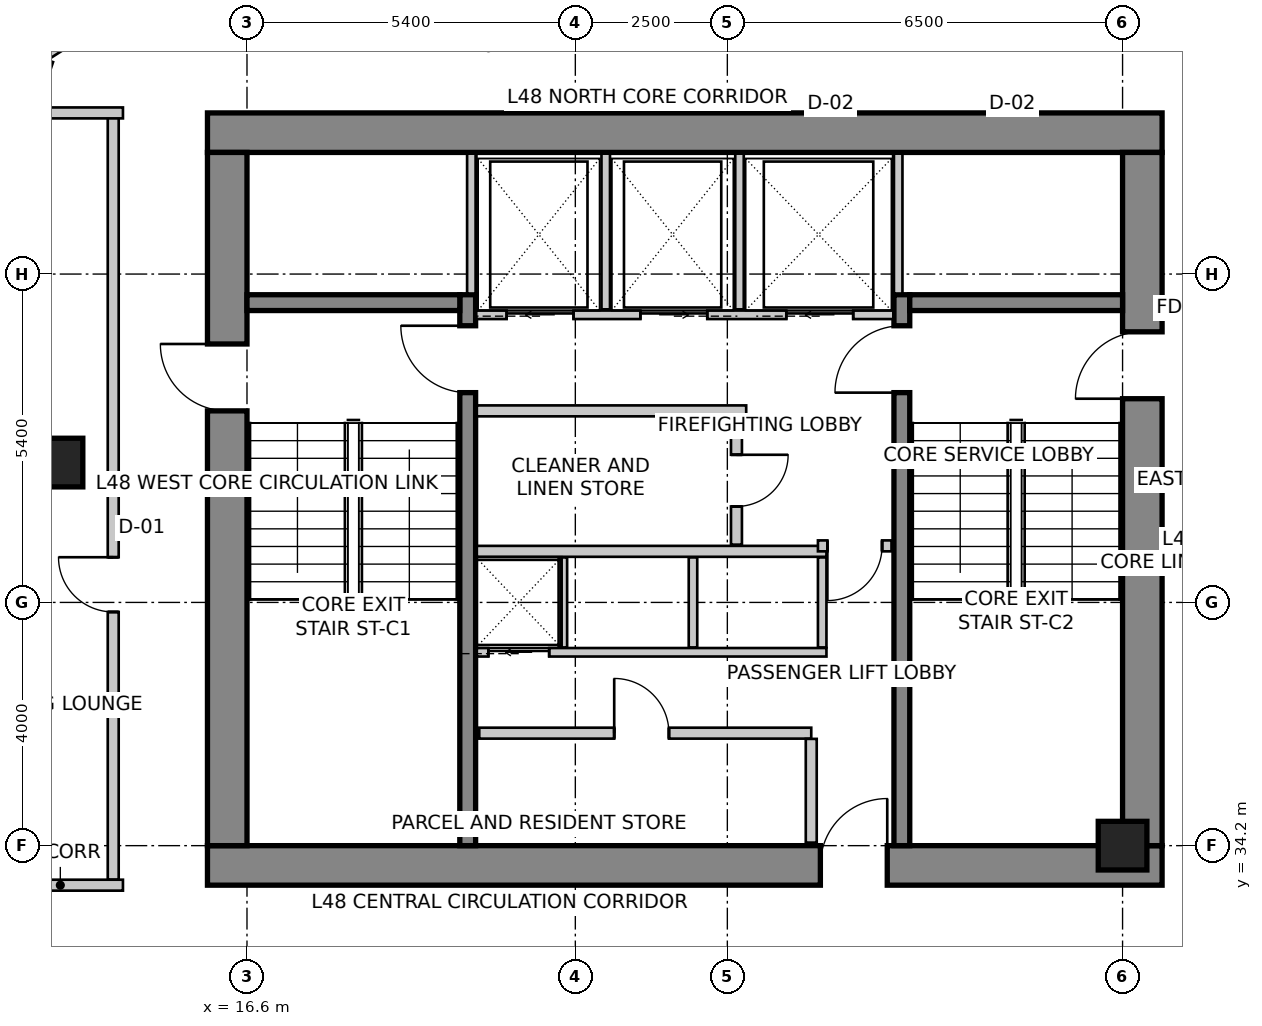
"""IFC4 building model, lengths in metres.
Left out: names, types, materials, properties, quantities, classifications, styles, units other than length and angle.
Written with IfcOpenShell. Run it as: python <this file> out.ifc"""

import sys

from ifc_helpers import new_model, si_unit, direction, frame, frame_2d, origin, origin_2d, place, context, subcontext, project, spatial, rectangle, extrude, source, transform, mapped, element, fill, save


model = new_model("IFC4")
c1 = context("Model", 3, precision=1e-05, world=origin(), true_north=direction((0.0, 1.0)))
c2 = subcontext(c1, "Body", "Model", "MODEL_VIEW")
j1 = project(units=[si_unit("LENGTHUNIT", "METRE"), si_unit("PLANEANGLEUNIT", "RADIAN")], contexts=[c1])
p1 = place(None, origin())
s1 = spatial("IfcSite", under=j1, at=p1, CompositionType="ELEMENT")
p2 = place(p1, origin())
s2 = spatial("IfcBuilding", under=s1, at=p2, CompositionType="ELEMENT")
p3 = place(p2, frame((0.0, 0.0, 193.9)))
s3 = spatial("IfcBuildingStorey", under=s2, at=p3, CompositionType="ELEMENT", Elevation=193.9)
p4 = place(p3, frame((15.95, 45.925, 0.0), z_axis=(0.0, 0.0, 1.0), x_axis=(1.0, 0.0, 0.0)))
e1 = element("IfcWall", 1, at=p4, inside=s3, PredefinedType="SHEAR", context=c2, shape_type="SweptSolid", body=[
    extrude(rectangle(XDim=15.7, YDim=0.65, at=frame_2d((7.85, 0.0))), origin(), (0.0, 0.0, 1.0), 3.5),
])
p5 = place(p3, frame((15.95, 33.875, 0.0), z_axis=(0.0, 0.0, 1.0), x_axis=(1.0, 0.0, 0.0)))
e2 = element("IfcWall", 2, at=p5, inside=s3, PredefinedType="SHEAR", context=c2, shape_type="SweptSolid", body=[
    extrude(rectangle(XDim=15.7, YDim=0.65, at=frame_2d((7.85, 0.0))), origin(), (0.0, 0.0, 1.0), 3.5),
])
m1 = source(origin(), c2, "Body", "SweptSolid", [
    extrude(rectangle(XDim=1.1, YDim=2.15, at=frame_2d((0.55, 1.075))), frame((0.0, 0.335, 0.0), z_axis=(0.0, -1.0, 0.0), x_axis=(1.0, 0.0, 0.0)), (0.0, 0.0, 1.0), 0.67),
])
p6 = place(p5, frame((10.08, 0.0, 0.0)))
e3 = element("IfcOpeningElement", 3, at=p6, cuts=e2, PredefinedType="OPENING", context=c2, shape_type="MappedRepresentation", body=[
    mapped(m1, transform((0.0, 0.0, 0.0), scale=1.0)),
])
p7 = place(p3, frame((16.275, 34.2, 0.0), z_axis=(0.0, 0.0, 1.0), x_axis=(0.0, 1.0, 0.0)))
e4 = element("IfcWall", 4, at=p7, inside=s3, PredefinedType="SHEAR", context=c2, shape_type="SweptSolid", body=[
    extrude(rectangle(XDim=11.4, YDim=0.65, at=frame_2d((5.7, 0.0))), origin(), (0.0, 0.0, 1.0), 3.5),
])
p8 = place(p7, frame((7.15, 0.0, 0.0)))
e5 = element("IfcOpeningElement", 5, at=p8, cuts=e4, PredefinedType="OPENING", context=c2, shape_type="MappedRepresentation", body=[
    mapped(m1, transform((0.0, 0.0, 0.0), scale=1.0)),
])
p9 = place(p3, frame((31.325, 34.2, 0.0), z_axis=(0.0, 0.0, 1.0), x_axis=(0.0, 1.0, 0.0)))
e6 = element("IfcWall", 6, at=p9, inside=s3, PredefinedType="SHEAR", context=c2, shape_type="SweptSolid", body=[
    extrude(rectangle(XDim=11.4, YDim=0.65, at=frame_2d((5.7, 0.0))), origin(), (0.0, 0.0, 1.0), 3.5),
])
p10 = place(p9, frame((7.35, 0.0, 0.0)))
e7 = element("IfcOpeningElement", 7, at=p10, cuts=e6, PredefinedType="OPENING", context=c2, shape_type="MappedRepresentation", body=[
    mapped(m1, transform((0.0, 0.0, 0.0), scale=1.0)),
])
p11 = place(p3, frame((20.23, 34.2, 0.0), z_axis=(0.0, 0.0, 1.0), x_axis=(0.0, 1.0, 0.0)))
e8 = element("IfcWall", 8, at=p11, inside=s3, PredefinedType="SHEAR", context=c2, shape_type="SweptSolid", body=[
    extrude(rectangle(XDim=9.06, YDim=0.26, at=frame_2d((4.53, 0.0))), origin(), (0.0, 0.0, 1.0), 3.5),
])
m2 = source(origin(), c2, "Body", "SweptSolid", [
    extrude(rectangle(XDim=1.1, YDim=2.15, at=frame_2d((0.55, 1.075))), frame((0.0, 0.14, 0.0), z_axis=(0.0, -1.0, 0.0), x_axis=(1.0, 0.0, 0.0)), (0.0, 0.0, 1.0), 0.28),
])
p12 = place(p11, frame((7.45, 0.0, 0.0)))
e9 = element("IfcOpeningElement", 9, at=p12, cuts=e8, PredefinedType="OPENING", context=c2, shape_type="MappedRepresentation", body=[
    mapped(m2, transform((0.0, 0.0, 0.0), scale=1.0)),
])
p13 = place(p3, frame((27.37, 34.2, 0.0), z_axis=(0.0, 0.0, 1.0), x_axis=(0.0, 1.0, 0.0)))
e10 = element("IfcWall", 10, at=p13, inside=s3, PredefinedType="SHEAR", context=c2, shape_type="SweptSolid", body=[
    extrude(rectangle(XDim=9.06, YDim=0.26, at=frame_2d((4.53, 0.0))), origin(), (0.0, 0.0, 1.0), 3.5),
])
p14 = place(p13, frame((7.45, 0.0, 0.0)))
e11 = element("IfcOpeningElement", 11, at=p14, cuts=e10, PredefinedType="OPENING", context=c2, shape_type="MappedRepresentation", body=[
    mapped(m2, transform((0.0, 0.0, 0.0), scale=1.0)),
])
for number, where, z_axis, x_axis in (
    (12, (16.6, 43.13, 0.0), (0.0, 0.0, 1.0), (1.0, 0.0, 0.0)),
    (13, (27.5, 43.13, 0.0), (0.0, 0.0, 1.0), (1.0, 0.0, 0.0)),
):
    element("IfcWall", number, at=place(p3, frame(where, z_axis=z_axis, x_axis=x_axis)), inside=s3, PredefinedType="SHEAR", context=c2, shape_type="SweptSolid", body=[
        extrude(rectangle(XDim=3.5, YDim=0.26, at=frame_2d((1.75, 0.0))), origin(), (0.0, 0.0, 1.0), 3.5),
    ])
m3 = source(origin(), c2, "Body", "SweptSolid", [
    extrude(rectangle(XDim=0.8, YDim=0.8, at=origin_2d()), origin(), (0.0, 0.0, 1.0), 3.5),
])
for number, where, z_axis, x_axis in (
    (14, (13.5, 40.5, 0.0), (0.0, 0.0, 1.0), (1.0, 0.0, 0.0)),
    (15, (31.0, 34.2, 0.0), (0.0, 0.0, 1.0), (1.0, 0.0, 0.0)),
):
    element("IfcColumn", number, at=place(p3, frame(where, z_axis=z_axis, x_axis=x_axis)), inside=s3, PredefinedType="COLUMN", context=c2, shape_type="MappedRepresentation", body=[
        mapped(m3, transform((0.0, 0.0, 0.0), scale=1.0)),
    ])
p15 = place(p3, frame((21.875, 52.742, 0.0), z_axis=(0.0, 0.0, 1.0), x_axis=(-0.843666375448, -0.536867811419, 0.0)))
e16 = element("IfcWall", 16, at=p15, inside=s3, PredefinedType="SOLIDWALL", context=c2, shape_type="SweptSolid", body=[
    extrude(rectangle(XDim=10.284, YDim=0.3, at=frame_2d((5.142, 0.0))), origin(), (0.0, 0.0, 1.0), 3.25),
])
m4 = source(origin(), c2, "Body", "SweptSolid", [
    extrude(rectangle(XDim=2.1, YDim=2.0, at=frame_2d((1.05, 1.0))), frame((0.0, 0.16, 0.0), z_axis=(0.0, -1.0, 0.0), x_axis=(1.0, 0.0, 0.0)), (0.0, 0.0, 1.0), 0.32),
])
p16 = place(p15, frame((3.457, 0.0, 0.85)))
e17 = element("IfcOpeningElement", 17, at=p16, cuts=e16, PredefinedType="OPENING", context=c2, shape_type="MappedRepresentation", body=[
    mapped(m4, transform((0.0, 0.0, 0.0), scale=1.0)),
])
p17 = place(p3, frame((13.269, 47.134, 0.0), z_axis=(0.0, 0.0, 1.0), x_axis=(-0.319920776449, -0.947444297464, 0.0)))
e18 = element("IfcWall", 18, at=p17, inside=s3, PredefinedType="SOLIDWALL", context=c2, shape_type="SweptSolid", body=[
    extrude(rectangle(XDim=16.133, YDim=0.3, at=frame_2d((8.067, 0.0))), origin(), (0.0, 0.0, 1.0), 3.25),
])
m5 = source(origin(), c2, "Body", "SweptSolid", [
    extrude(rectangle(XDim=2.4, YDim=2.2, at=frame_2d((1.2, 1.1))), frame((0.0, 0.16, 0.0), z_axis=(0.0, -1.0, 0.0), x_axis=(1.0, 0.0, 0.0)), (0.0, 0.0, 1.0), 0.32),
])
p18 = place(p17, frame((2.363, 0.0, 0.85)))
e19 = element("IfcOpeningElement", 19, at=p18, cuts=e18, PredefinedType="OPENING", context=c2, shape_type="MappedRepresentation", body=[
    mapped(m5, transform((0.0, 0.0, 0.0), scale=1.0)),
])
p19 = place(p17, frame((7.41, 0.0, 0.85)))
e20 = element("IfcOpeningElement", 20, at=p19, cuts=e18, PredefinedType="OPENING", context=c2, shape_type="MappedRepresentation", body=[
    mapped(m4, transform((0.0, 0.0, 0.0), scale=1.0)),
])
p20 = place(p17, frame((12.157, 0.0, 0.85)))
e21 = element("IfcOpeningElement", 21, at=p20, cuts=e18, PredefinedType="OPENING", context=c2, shape_type="MappedRepresentation", body=[
    mapped(m5, transform((0.0, 0.0, 0.0), scale=1.0)),
])
p21 = place(p3, frame((20.37, 42.93, 0.0), z_axis=(0.0, 0.0, 1.0), x_axis=(1.0, 0.0, 0.0)))
e22 = element("IfcWall", 22, at=p21, inside=s3, PredefinedType="SOLIDWALL", context=c2, shape_type="SweptSolid", body=[
    extrude(rectangle(XDim=6.86, YDim=0.14, at=frame_2d((3.43, 0.0))), origin(), (0.0, 0.0, 1.0), 3.25),
])
m6 = source(origin(), c2, "Body", "SweptSolid", [
    extrude(rectangle(XDim=1.1, YDim=2.15, at=frame_2d((0.55, 1.075))), frame((0.0, 0.08, 0.0), z_axis=(0.0, -1.0, 0.0), x_axis=(1.0, 0.0, 0.0)), (0.0, 0.0, 1.0), 0.16),
])
p22 = place(p21, frame((0.5, 0.0, 0.0)))
e23 = element("IfcOpeningElement", 23, at=p22, cuts=e22, PredefinedType="OPENING", context=c2, shape_type="MappedRepresentation", body=[
    mapped(m6, transform((0.0, 0.0, 0.0), scale=1.0)),
])
p23 = place(p21, frame((2.7, 0.0, 0.0)))
e24 = element("IfcOpeningElement", 24, at=p23, cuts=e22, PredefinedType="OPENING", context=c2, shape_type="MappedRepresentation", body=[
    mapped(m6, transform((0.0, 0.0, 0.0), scale=1.0)),
])
p24 = place(p21, frame((5.1, 0.0, 0.0)))
e25 = element("IfcOpeningElement", 25, at=p24, cuts=e22, PredefinedType="OPENING", context=c2, shape_type="MappedRepresentation", body=[
    mapped(m6, transform((0.0, 0.0, 0.0), scale=1.0)),
])
for number, where, z_axis, x_axis in (
    (26, (20.29, 43.28, 0.0), (0.0, 0.0, 1.0), (0.0, 1.0, 0.0)),
    (27, (27.31, 43.28, 0.0), (0.0, 0.0, 1.0), (0.0, 1.0, 0.0)),
):
    element("IfcWall", number, at=place(p3, frame(where, z_axis=z_axis, x_axis=x_axis)), inside=s3, PredefinedType="SOLIDWALL", context=c2, shape_type="SweptSolid", body=[
        extrude(rectangle(XDim=2.3, YDim=0.14, at=frame_2d((1.15, 0.0))), origin(), (0.0, 0.0, 1.0), 3.25),
    ])
for number, where, z_axis, x_axis in (
    (28, (22.5, 43.02, 0.0), (0.0, 0.0, 1.0), (0.0, 1.0, 0.0)),
    (29, (24.7, 43.02, 0.0), (0.0, 0.0, 1.0), (0.0, 1.0, 0.0)),
):
    element("IfcWall", number, at=place(p3, frame(where, z_axis=z_axis, x_axis=x_axis)), inside=s3, PredefinedType="SOLIDWALL", context=c2, shape_type="SweptSolid", body=[
        extrude(rectangle(XDim=2.56, YDim=0.14, at=frame_2d((1.28, 0.0))), origin(), (0.0, 0.0, 1.0), 3.25),
    ])
p25 = place(p3, frame((20.38, 37.38, 0.0), z_axis=(0.0, 0.0, 1.0), x_axis=(1.0, 0.0, 0.0)))
e30 = element("IfcWall", 30, at=p25, inside=s3, PredefinedType="SOLIDWALL", context=c2, shape_type="SweptSolid", body=[
    extrude(rectangle(XDim=5.75, YDim=0.14, at=frame_2d((2.875, 0.0))), origin(), (0.0, 0.0, 1.0), 3.25),
])
m7 = source(origin(), c2, "Body", "SweptSolid", [
    extrude(rectangle(XDim=1.0, YDim=2.15, at=frame_2d((0.5, 1.075))), frame((0.0, 0.08, 0.0), z_axis=(0.0, -1.0, 0.0), x_axis=(1.0, 0.0, 0.0)), (0.0, 0.0, 1.0), 0.16),
])
p26 = place(p25, frame((0.19, 0.0, 0.0)))
e31 = element("IfcOpeningElement", 31, at=p26, cuts=e30, PredefinedType="OPENING", context=c2, shape_type="MappedRepresentation", body=[
    mapped(m7, transform((0.0, 0.0, 0.0), scale=1.0)),
])
p27 = place(p3, frame((20.38, 39.04, 0.0), z_axis=(0.0, 0.0, 1.0), x_axis=(1.0, 0.0, 0.0)))
e32 = element("IfcWall", 32, at=p27, inside=s3, PredefinedType="SOLIDWALL", context=c2, shape_type="SweptSolid", body=[
    extrude(rectangle(XDim=5.75, YDim=0.18, at=frame_2d((2.875, 0.0))), origin(), (0.0, 0.0, 1.0), 3.25),
])
for number, where, z_axis, x_axis in (
    (33, (26.06, 37.46, 0.0), (0.0, 0.0, 1.0), (0.0, 1.0, 0.0)),
    (34, (21.795, 37.46, 0.0), (0.0, 0.0, 1.0), (0.0, 1.0, 0.0)),
    (35, (23.935, 37.46, 0.0), (0.0, 0.0, 1.0), (0.0, 1.0, 0.0)),
):
    element("IfcWall", number, at=place(p3, frame(where, z_axis=z_axis, x_axis=x_axis)), inside=s3, PredefinedType="SOLIDWALL", context=c2, shape_type="SweptSolid", body=[
        extrude(rectangle(XDim=1.48, YDim=0.14, at=frame_2d((0.74, 0.0))), origin(), (0.0, 0.0, 1.0), 3.25),
    ])
p28 = place(p3, frame((24.81, 41.35, 0.0), z_axis=(0.0, 0.0, 1.0), x_axis=(-1.0, 0.0, 0.0)))
e36 = element("IfcWall", 36, at=p28, inside=s3, PredefinedType="PARTITIONING", context=c2, shape_type="SweptSolid", body=[
    extrude(rectangle(XDim=4.43, YDim=0.18, at=frame_2d((2.215, 0.0))), origin(), (0.0, 0.0, 1.0), 3.25),
])
p29 = place(p3, frame((24.65, 41.256, 0.0), z_axis=(0.0, 0.0, 1.0), x_axis=(0.0, -1.0, 0.0)))
e37 = element("IfcWall", 37, at=p29, inside=s3, PredefinedType="PARTITIONING", context=c2, shape_type="SweptSolid", body=[
    extrude(rectangle(XDim=2.106, YDim=0.18, at=frame_2d((1.053, 0.0))), origin(), (0.0, 0.0, 1.0), 3.25),
])
m8 = source(origin(), c2, "Body", "SweptSolid", [
    extrude(rectangle(XDim=0.85, YDim=2.15, at=frame_2d((0.425, 1.075))), frame((0.0, 0.1, 0.0), z_axis=(0.0, -1.0, 0.0), x_axis=(1.0, 0.0, 0.0)), (0.0, 0.0, 1.0), 0.2),
])
p30 = place(p29, frame((0.628, 0.0, 0.0)))
e38 = element("IfcOpeningElement", 38, at=p30, cuts=e37, PredefinedType="OPENING", context=c2, shape_type="MappedRepresentation", body=[
    mapped(m8, transform((0.0, 0.0, 0.0), scale=1.0)),
])
p31 = place(p3, frame((27.2, 39.13, 0.0), z_axis=(0.0, 0.0, 1.0), x_axis=(-1.0, 0.0, 0.0)))
e39 = element("IfcWall", 39, at=p31, inside=s3, PredefinedType="PARTITIONING", context=c2, shape_type="SweptSolid", body=[
    extrude(rectangle(XDim=1.21, YDim=0.18, at=frame_2d((0.605, 0.0))), origin(), (0.0, 0.0, 1.0), 3.25),
])
m9 = source(origin(), c2, "Body", "SweptSolid", [
    extrude(rectangle(XDim=0.9, YDim=2.15, at=frame_2d((0.45, 1.075))), frame((0.0, 0.1, 0.0), z_axis=(0.0, -1.0, 0.0), x_axis=(1.0, 0.0, 0.0)), (0.0, 0.0, 1.0), 0.2),
])
p32 = place(p31, frame((0.155, 0.0, 0.0)))
e40 = element("IfcOpeningElement", 40, at=p32, cuts=e39, PredefinedType="OPENING", context=c2, shape_type="MappedRepresentation", body=[
    mapped(m9, transform((0.0, 0.0, 0.0), scale=1.0)),
])
p33 = place(p3, frame((20.42, 36.05, 0.0), z_axis=(0.0, 0.0, 1.0), x_axis=(1.0, 0.0, 0.0)))
e41 = element("IfcWall", 41, at=p33, inside=s3, PredefinedType="PARTITIONING", context=c2, shape_type="SweptSolid", body=[
    extrude(rectangle(XDim=5.46, YDim=0.18, at=frame_2d((2.73, 0.0))), origin(), (0.0, 0.0, 1.0), 3.25),
])
p34 = place(p33, frame((2.219, 0.0, 0.0)))
e42 = element("IfcOpeningElement", 42, at=p34, cuts=e41, PredefinedType="OPENING", context=c2, shape_type="MappedRepresentation", body=[
    mapped(m9, transform((0.0, 0.0, 0.0), scale=1.0)),
])
p35 = place(p3, frame((25.88, 35.956, 0.0), z_axis=(0.0, 0.0, 1.0), x_axis=(0.0, -1.0, 0.0)))
e43 = element("IfcWall", 43, at=p35, inside=s3, PredefinedType="PARTITIONING", context=c2, shape_type="SweptSolid", body=[
    extrude(rectangle(XDim=1.706, YDim=0.18, at=frame_2d((0.853, 0.0))), origin(), (0.0, 0.0, 1.0), 2.542),
])
p36 = place(p3, frame((12.5, 33.55, 0.0), z_axis=(0.0, 0.0, 1.0), x_axis=(1.0, 0.0, 0.0)))
e44 = element("IfcWall", 44, at=p36, inside=s3, PredefinedType="PARTITIONING", context=c2, shape_type="SweptSolid", body=[
    extrude(rectangle(XDim=2.06, YDim=0.18, at=frame_2d((1.03, 0.0))), origin(), (0.0, 0.0, 1.0), 3.25),
])
p37 = place(p3, frame((14.4, 33.644, 0.0), z_axis=(0.0, 0.0, 1.0), x_axis=(0.0, 1.0, 0.0)))
e45 = element("IfcWall", 45, at=p37, inside=s3, PredefinedType="PARTITIONING", context=c2, shape_type="SweptSolid", body=[
    extrude(rectangle(XDim=12.606, YDim=0.18, at=frame_2d((6.303, 0.0))), origin(), (0.0, 0.0, 1.0), 3.25),
])
p38 = place(p37, frame((4.399, 0.0, 0.0)))
e46 = element("IfcOpeningElement", 46, at=p38, cuts=e45, PredefinedType="OPENING", context=c2, shape_type="MappedRepresentation", body=[
    mapped(m9, transform((0.0, 0.0, 0.0), scale=1.0)),
])
p39 = place(p3, frame((14.56, 46.25, 0.0), z_axis=(0.0, 0.0, 1.0), x_axis=(-1.0, 0.0, 0.0)))
e47 = element("IfcWall", 47, at=p39, inside=s3, PredefinedType="PARTITIONING", context=c2, shape_type="SweptSolid", body=[
    extrude(rectangle(XDim=1.469, YDim=0.18, at=frame_2d((0.734, 0.0))), origin(), (0.0, 0.0, 1.0), 3.25),
])
m10 = source(origin(), c2, "Body", "SweptSolid", [
    extrude(rectangle(XDim=1.1, YDim=2.15, at=frame_2d((0.55, 1.075))), frame((0.0, 0.025, 0.0), z_axis=(0.0, -1.0, 0.0), x_axis=(1.0, 0.0, 0.0)), (0.0, 0.0, 1.0), 0.05),
])
p40 = place(p22, origin())
e48 = element("IfcDoor", 48, at=p40, inside=s3, OperationType="SLIDING_TO_LEFT", PredefinedType="DOOR", context=c2, shape_type="MappedRepresentation", body=[
    mapped(m10, transform((0.0, 0.0, 0.0), scale=1.0)),
])
fill(e23, e48)
p41 = place(p23, origin())
e49 = element("IfcDoor", 49, at=p41, inside=s3, OperationType="SLIDING_TO_RIGHT", PredefinedType="DOOR", context=c2, shape_type="MappedRepresentation", body=[
    mapped(m10, transform((0.0, 0.0, 0.0), scale=1.0)),
])
fill(e24, e49)
m11 = source(origin(), c2, "Body", "SweptSolid", [
    extrude(rectangle(XDim=1.1, YDim=2.15, at=frame_2d((0.55, 1.075))), frame((0.0, 0.025, 0.0), z_axis=(0.0, -1.0, 0.0), x_axis=(1.0, 0.0, 0.0)), (0.0, 0.0, 1.0), 0.05),
])
p42 = place(p24, origin())
e50 = element("IfcDoor", 50, at=p42, inside=s3, OperationType="SLIDING_TO_LEFT", PredefinedType="DOOR", context=c2, shape_type="MappedRepresentation", body=[
    mapped(m11, transform((0.0, 0.0, 0.0), scale=1.0)),
])
fill(e25, e50)
m12 = source(origin(), c2, "Body", "SweptSolid", [
    extrude(rectangle(XDim=1.0, YDim=2.15, at=frame_2d((0.5, 1.075))), frame((0.0, 0.025, 0.0), z_axis=(0.0, -1.0, 0.0), x_axis=(1.0, 0.0, 0.0)), (0.0, 0.0, 1.0), 0.05),
])
p43 = place(p26, origin())
e51 = element("IfcDoor", 51, at=p43, inside=s3, OperationType="SLIDING_TO_LEFT", PredefinedType="DOOR", context=c2, shape_type="MappedRepresentation", body=[
    mapped(m12, transform((0.0, 0.0, 0.0), scale=1.0)),
])
fill(e31, e51)
m13 = source(origin(), c2, "Body", "SweptSolid", [
    extrude(rectangle(XDim=1.1, YDim=2.15, at=frame_2d((0.55, 1.075))), frame((0.0, 0.025, 0.0), z_axis=(0.0, -1.0, 0.0), x_axis=(1.0, 0.0, 0.0)), (0.0, 0.0, 1.0), 0.05),
])
p44 = place(p12, origin())
e52 = element("IfcDoor", 52, at=p44, inside=s3, OperationType="SINGLE_SWING_RIGHT", PredefinedType="DOOR", context=c2, shape_type="MappedRepresentation", body=[
    mapped(m13, transform((0.0, 0.0, 0.0), scale=1.0)),
])
fill(e9, e52)
p45 = place(p14, origin())
e53 = element("IfcDoor", 53, at=p45, inside=s3, OperationType="SINGLE_SWING_LEFT", PredefinedType="DOOR", context=c2, shape_type="MappedRepresentation", body=[
    mapped(m13, transform((0.0, 0.0, 0.0), scale=1.0)),
])
fill(e11, e53)
p46 = place(p8, origin())
e54 = element("IfcDoor", 54, at=p46, inside=s3, OperationType="SINGLE_SWING_RIGHT", PredefinedType="DOOR", context=c2, shape_type="MappedRepresentation", body=[
    mapped(m13, transform((0.0, 0.0, 0.0), scale=1.0)),
])
fill(e5, e54)
p47 = place(p10, origin())
e55 = element("IfcDoor", 55, at=p47, inside=s3, OperationType="SINGLE_SWING_LEFT", PredefinedType="DOOR", context=c2, shape_type="MappedRepresentation", body=[
    mapped(m13, transform((0.0, 0.0, 0.0), scale=1.0)),
])
fill(e7, e55)
p48 = place(p6, origin())
e56 = element("IfcDoor", 56, at=p48, inside=s3, OperationType="SINGLE_SWING_RIGHT", PredefinedType="DOOR", context=c2, shape_type="MappedRepresentation", body=[
    mapped(m13, transform((0.0, 0.0, 0.0), scale=1.0)),
])
fill(e3, e56)
m14 = source(origin(), c2, "Body", "SweptSolid", [
    extrude(rectangle(XDim=0.85, YDim=2.15, at=frame_2d((0.425, 1.075))), frame((0.0, 0.025, 0.0), z_axis=(0.0, -1.0, 0.0), x_axis=(1.0, 0.0, 0.0)), (0.0, 0.0, 1.0), 0.05),
])
p49 = place(p30, origin())
e57 = element("IfcDoor", 57, at=p49, inside=s3, OperationType="SINGLE_SWING_LEFT", PredefinedType="DOOR", context=c2, shape_type="MappedRepresentation", body=[
    mapped(m14, transform((0.0, 0.0, 0.0), scale=1.0)),
])
fill(e38, e57)
m15 = source(origin(), c2, "Body", "SweptSolid", [
    extrude(rectangle(XDim=0.9, YDim=2.15, at=frame_2d((0.45, 1.075))), frame((0.0, 0.025, 0.0), z_axis=(0.0, -1.0, 0.0), x_axis=(1.0, 0.0, 0.0)), (0.0, 0.0, 1.0), 0.05),
])
p50 = place(p32, origin())
e58 = element("IfcDoor", 58, at=p50, inside=s3, OperationType="SINGLE_SWING_RIGHT", PredefinedType="DOOR", context=c2, shape_type="MappedRepresentation", body=[
    mapped(m15, transform((0.0, 0.0, 0.0), scale=1.0)),
])
fill(e40, e58)
p51 = place(p34, origin())
e59 = element("IfcDoor", 59, at=p51, inside=s3, OperationType="SINGLE_SWING_LEFT", PredefinedType="DOOR", context=c2, shape_type="MappedRepresentation", body=[
    mapped(m15, transform((0.0, 0.0, 0.0), scale=1.0)),
])
fill(e42, e59)
m16 = source(origin(), c2, "Body", "SweptSolid", [
    extrude(rectangle(XDim=0.9, YDim=2.15, at=frame_2d((0.45, 1.075))), frame((0.0, 0.025, 0.0), z_axis=(0.0, -1.0, 0.0), x_axis=(1.0, 0.0, 0.0)), (0.0, 0.0, 1.0), 0.05),
])
p52 = place(p38, origin())
e60 = element("IfcDoor", 60, at=p52, inside=s3, OperationType="SINGLE_SWING_RIGHT", PredefinedType="DOOR", context=c2, shape_type="MappedRepresentation", body=[
    mapped(m16, transform((0.0, 0.0, 0.0), scale=1.0)),
])
fill(e46, e60)
save(model, sys.argv[1])
